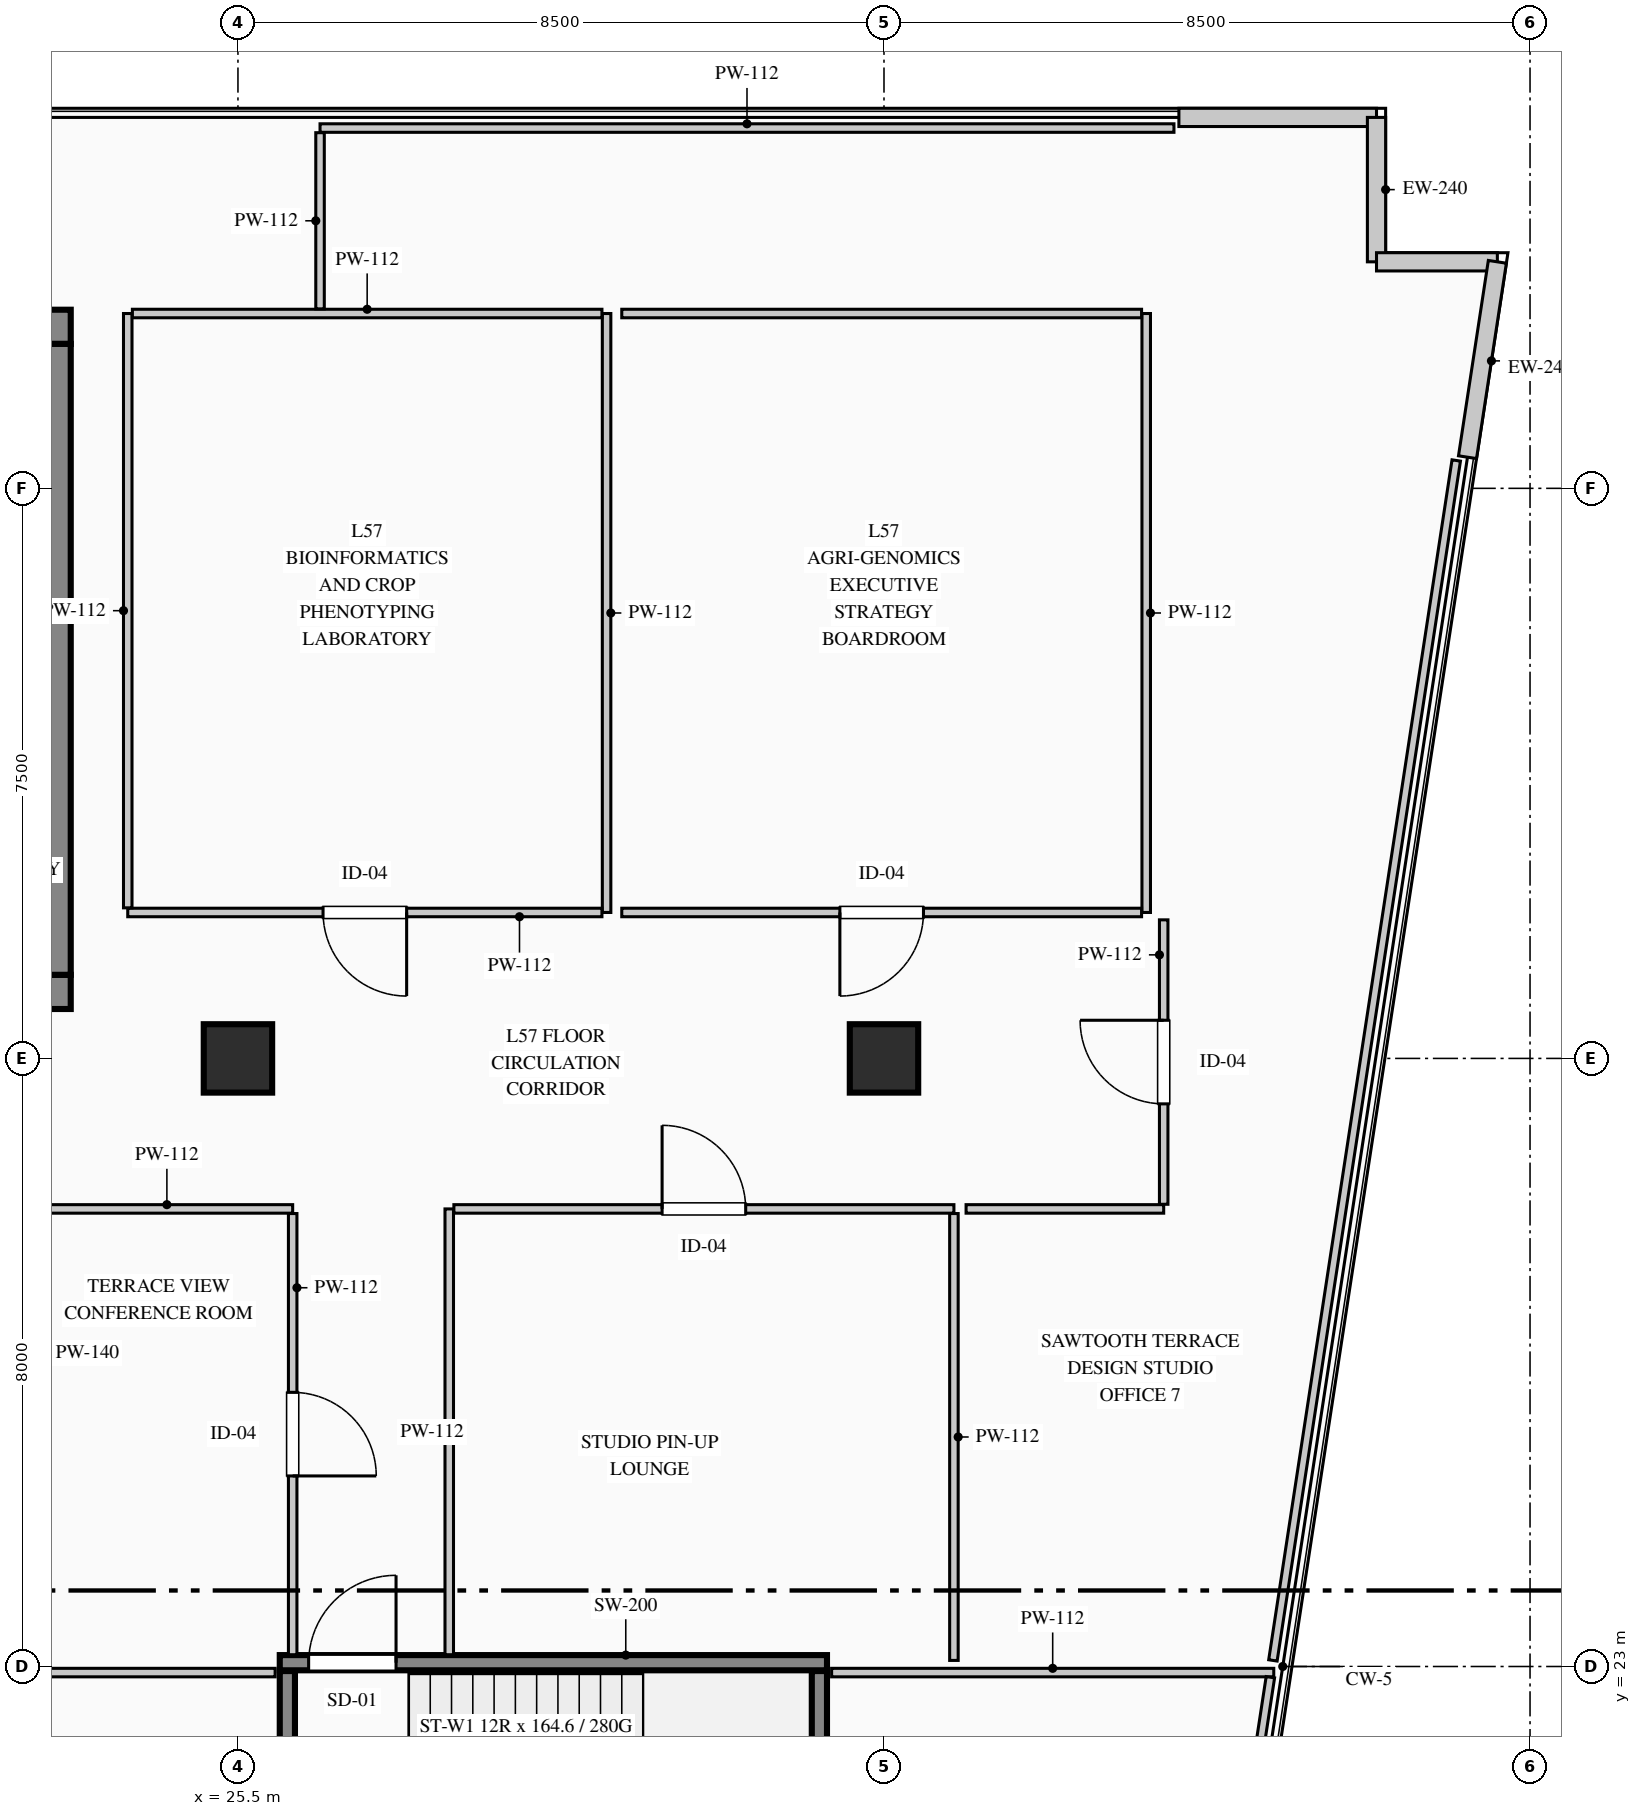
"""IFC4 building model, lengths in metres.
Left out: names, types, materials, properties, quantities, classifications, styles, units other than length and angle.
Written with IfcOpenShell. Run it as: python <this file> out.ifc"""

import sys

from ifc_helpers import new_model, si_unit, direction, frame, frame_2d, origin, origin_2d, place, context, subcontext, project, spatial, rectangle, extrude, element, fill, save


model = new_model("IFC4")
c1 = context("Model", 3, precision=1e-05, world=origin(), true_north=direction((0.0, 1.0)))
c2 = subcontext(c1, "Body", "Model", "MODEL_VIEW")
j1 = project(units=[si_unit("LENGTHUNIT", "METRE"), si_unit("PLANEANGLEUNIT", "RADIAN")], contexts=[c1])
p1 = place(None, origin())
s1 = spatial("IfcSite", under=j1, at=p1, CompositionType="ELEMENT")
p2 = place(p1, origin())
s2 = spatial("IfcBuilding", under=s1, at=p2, CompositionType="ELEMENT")
p3 = place(p2, frame((0.0, 0.0, 239.05)))
s3 = spatial("IfcBuildingStorey", under=s2, at=p3, CompositionType="ELEMENT", Elevation=239.05)
p4 = place(p3, frame((5.55, 40.625, 0.0), z_axis=(0.0, 0.0, 1.0), x_axis=(1.0, 0.0, 0.0)))
e1 = element("IfcWall", 1, at=p4, inside=s3, PredefinedType="SHEAR", context=c2, shape_type="SweptSolid", body=[
    extrude(rectangle(XDim=17.75, YDim=0.45, at=frame_2d((8.875, 0.0))), origin(), (0.0, 0.0, 1.0), 3.95),
])
p5 = place(p4, frame((15.895, 0.0, 0.0)))
e2 = element("IfcOpeningElement", 2, at=p5, cuts=e1, PredefinedType="OPENING", context=c2, shape_type="SweptSolid", body=[
    extrude(rectangle(XDim=1.18, YDim=2.25, at=frame_2d((0.59, 1.125))), frame((0.0, 0.235, 0.0), z_axis=(0.0, -1.0, 0.0), x_axis=(1.0, 0.0, 0.0)), (0.0, 0.0, 1.0), 0.47),
])
p6 = place(p3, frame((5.55, 31.875, 0.0), z_axis=(0.0, 0.0, 1.0), x_axis=(1.0, 0.0, 0.0)))
e3 = element("IfcWall", 3, at=p6, inside=s3, PredefinedType="SHEAR", context=c2, shape_type="SweptSolid", body=[
    extrude(rectangle(XDim=17.75, YDim=0.45, at=frame_2d((8.875, 0.0))), origin(), (0.0, 0.0, 1.0), 3.95),
])
p7 = place(p6, frame((3.1, 0.0, 0.0)))
e4 = element("IfcOpeningElement", 4, at=p7, cuts=e3, PredefinedType="OPENING", context=c2, shape_type="SweptSolid", body=[
    extrude(rectangle(XDim=1.2, YDim=2.2, at=frame_2d((0.6, 1.1))), frame((0.0, 0.235, 0.0), z_axis=(0.0, -1.0, 0.0), x_axis=(1.0, 0.0, 0.0)), (0.0, 0.0, 1.0), 0.47),
])
p8 = place(p6, frame((6.95, 0.0, 0.0)))
e5 = element("IfcOpeningElement", 5, at=p8, cuts=e3, PredefinedType="OPENING", context=c2, shape_type="SweptSolid", body=[
    extrude(rectangle(XDim=1.2, YDim=2.2, at=frame_2d((0.6, 1.1))), frame((0.0, 0.235, 0.0), z_axis=(0.0, -1.0, 0.0), x_axis=(1.0, 0.0, 0.0)), (0.0, 0.0, 1.0), 0.47),
])
p9 = place(p6, frame((8.8, 0.0, 0.0)))
e6 = element("IfcOpeningElement", 6, at=p9, cuts=e3, PredefinedType="OPENING", context=c2, shape_type="SweptSolid", body=[
    extrude(rectangle(XDim=1.15, YDim=2.2, at=frame_2d((0.575, 1.1))), frame((0.0, 0.235, 0.0), z_axis=(0.0, -1.0, 0.0), x_axis=(1.0, 0.0, 0.0)), (0.0, 0.0, 1.0), 0.47),
])
p10 = place(p6, frame((15.9, 0.0, 0.0)))
e7 = element("IfcOpeningElement", 7, at=p10, cuts=e3, PredefinedType="OPENING", context=c2, shape_type="SweptSolid", body=[
    extrude(rectangle(XDim=1.2, YDim=2.2, at=frame_2d((0.6, 1.1))), frame((0.0, 0.235, 0.0), z_axis=(0.0, -1.0, 0.0), x_axis=(1.0, 0.0, 0.0)), (0.0, 0.0, 1.0), 0.47),
])
p11 = place(p3, frame((23.075, 32.1, 0.0), z_axis=(0.0, 0.0, 1.0), x_axis=(0.0, 1.0, 0.0)))
e8 = element("IfcWall", 8, at=p11, inside=s3, PredefinedType="SHEAR", context=c2, shape_type="SweptSolid", body=[
    extrude(rectangle(XDim=8.3, YDim=0.45, at=frame_2d((4.15, 0.0))), origin(), (0.0, 0.0, 1.0), 3.95),
])
p12 = place(p3, frame((26.05, 23.05, 0.0), z_axis=(0.0, 0.0, 1.0), x_axis=(1.0, 0.0, 0.0)))
e9 = element("IfcWall", 9, at=p12, inside=s3, PredefinedType="SHEAR", context=c2, shape_type="SweptSolid", body=[
    extrude(rectangle(XDim=7.2, YDim=0.2, at=frame_2d((3.6, 0.0))), origin(), (0.0, 0.0, 1.0), 3.95),
])
p13 = place(p12, frame((0.38, 0.0, 0.0)))
e10 = element("IfcOpeningElement", 10, at=p13, cuts=e9, PredefinedType="OPENING", context=c2, shape_type="SweptSolid", body=[
    extrude(rectangle(XDim=1.15, YDim=2.2, at=frame_2d((0.575, 1.1))), frame((0.0, 0.11, 0.0), z_axis=(0.0, -1.0, 0.0), x_axis=(1.0, 0.0, 0.0)), (0.0, 0.0, 1.0), 0.22),
])
for number, where, z_axis, x_axis in (
    (11, (26.15, 19.81, 0.0), (0.0, 0.0, 1.0), (0.0, 1.0, 0.0)),
    (12, (33.15, 19.81, 0.0), (0.0, 0.0, 1.0), (0.0, 1.0, 0.0)),
):
    element("IfcWall", number, at=place(p3, frame(where, z_axis=z_axis, x_axis=x_axis)), inside=s3, PredefinedType="SHEAR", context=c2, shape_type="SweptSolid", body=[
        extrude(rectangle(XDim=3.13, YDim=0.2, at=frame_2d((1.565, 0.0))), origin(), (0.0, 0.0, 1.0), 3.95),
    ])
for number, where, z_axis, x_axis in (
    (13, (25.5, 31.0, 0.0), (0.0, 0.0, 1.0), (1.0, 0.0, 0.0)),
    (14, (34.0, 31.0, 0.0), (0.0, 0.0, 1.0), (1.0, 0.0, 0.0)),
):
    element("IfcColumn", number, at=place(p3, frame(where, z_axis=z_axis, x_axis=x_axis)), inside=s3, PredefinedType="COLUMN", context=c2, shape_type="SweptSolid", body=[
        extrude(rectangle(XDim=0.9, YDim=0.9, at=origin_2d()), origin(), (0.0, 0.0, 1.0), 3.95),
    ])
p14 = place(p3, frame((37.88, 43.38, 0.0), z_axis=(0.0, 0.0, 1.0), x_axis=(1.0, 0.0, 0.0)))
e15 = element("IfcWall", 15, at=p14, inside=s3, PredefinedType="STANDARD", context=c2, shape_type="SweptSolid", body=[
    extrude(rectangle(XDim=2.6, YDim=0.24, at=frame_2d((1.3, 0.0))), origin(), (0.0, 0.0, 1.0), 3.7),
])
p15 = place(p3, frame((40.48, 43.38, 0.0), z_axis=(0.0, 0.0, 1.0), x_axis=(0.0, -1.0, 0.0)))
e16 = element("IfcWall", 16, at=p15, inside=s3, PredefinedType="STANDARD", context=c2, shape_type="SweptSolid", body=[
    extrude(rectangle(XDim=1.9, YDim=0.24, at=frame_2d((0.95, 0.0))), origin(), (0.0, 0.0, 1.0), 3.7),
])
p16 = place(p3, frame((40.48, 41.48, 0.0), z_axis=(0.0, 0.0, 1.0), x_axis=(1.0, 0.0, 0.0)))
e17 = element("IfcWall", 17, at=p16, inside=s3, PredefinedType="STANDARD", context=c2, shape_type="SweptSolid", body=[
    extrude(rectangle(XDim=1.59, YDim=0.24, at=frame_2d((0.795, 0.0))), origin(), (0.0, 0.0, 1.0), 3.7),
])
p17 = place(p3, frame((42.07, 41.48, 0.0), z_axis=(0.0, 0.0, 1.0), x_axis=(-0.151090396132, -0.988519950328, 0.0)))
e18 = element("IfcWall", 18, at=p17, inside=s3, PredefinedType="STANDARD", context=c2, shape_type="SweptSolid", body=[
    extrude(rectangle(XDim=2.6, YDim=0.24, at=frame_2d((1.3, 0.0))), origin(), (0.0, 0.0, 1.0), 3.7),
])
p18 = place(p3, frame((30.35, 40.8, 0.0), z_axis=(0.0, 0.0, 1.0), x_axis=(0.0, -1.0, 0.0)))
e19 = element("IfcWall", 19, at=p18, inside=s3, PredefinedType="PARTITIONING", context=c2, shape_type="SweptSolid", body=[
    extrude(rectangle(XDim=7.88, YDim=0.112, at=frame_2d((3.94, 0.0))), origin(), (0.0, 0.0, 1.0), 3.7),
])
p19 = place(p3, frame((30.289, 32.92, 0.0), z_axis=(0.0, 0.0, 1.0), x_axis=(-1.0, 0.0, 0.0)))
e20 = element("IfcWall", 20, at=p19, inside=s3, PredefinedType="PARTITIONING", context=c2, shape_type="SweptSolid", body=[
    extrude(rectangle(XDim=6.239, YDim=0.112, at=frame_2d((3.12, 0.0))), origin(), (0.0, 0.0, 1.0), 3.7),
])
p20 = place(p19, frame((2.57, 0.0, 0.0)))
e21 = element("IfcOpeningElement", 21, at=p20, cuts=e20, PredefinedType="OPENING", context=c2, shape_type="SweptSolid", body=[
    extrude(rectangle(XDim=1.1, YDim=2.2, at=frame_2d((0.55, 1.1))), frame((0.0, 0.066, 0.0), z_axis=(0.0, -1.0, 0.0), x_axis=(1.0, 0.0, 0.0)), (0.0, 0.0, 1.0), 0.132),
])
p21 = place(p3, frame((24.05, 32.981, 0.0), z_axis=(0.0, 0.0, 1.0), x_axis=(0.0, 1.0, 0.0)))
e22 = element("IfcWall", 22, at=p21, inside=s3, PredefinedType="PARTITIONING", context=c2, shape_type="SweptSolid", body=[
    extrude(rectangle(XDim=7.819, YDim=0.112, at=frame_2d((3.91, 0.0))), origin(), (0.0, 0.0, 1.0), 3.7),
])
p22 = place(p3, frame((24.111, 40.8, 0.0), z_axis=(0.0, 0.0, 1.0), x_axis=(1.0, 0.0, 0.0)))
e23 = element("IfcWall", 23, at=p22, inside=s3, PredefinedType="PARTITIONING", context=c2, shape_type="SweptSolid", body=[
    extrude(rectangle(XDim=6.178, YDim=0.112, at=frame_2d((3.089, 0.0))), origin(), (0.0, 0.0, 1.0), 3.7),
])
p23 = place(p3, frame((37.45, 40.8, 0.0), z_axis=(0.0, 0.0, 1.0), x_axis=(0.0, -1.0, 0.0)))
e24 = element("IfcWall", 24, at=p23, inside=s3, PredefinedType="PARTITIONING", context=c2, shape_type="SweptSolid", body=[
    extrude(rectangle(XDim=7.88, YDim=0.112, at=frame_2d((3.94, 0.0))), origin(), (0.0, 0.0, 1.0), 3.7),
])
p24 = place(p3, frame((37.389, 32.92, 0.0), z_axis=(0.0, 0.0, 1.0), x_axis=(-1.0, 0.0, 0.0)))
e25 = element("IfcWall", 25, at=p24, inside=s3, PredefinedType="PARTITIONING", context=c2, shape_type="SweptSolid", body=[
    extrude(rectangle(XDim=6.839, YDim=0.112, at=frame_2d((3.419, 0.0))), origin(), (0.0, 0.0, 1.0), 3.7),
])
p25 = place(p24, frame((2.869, 0.0, 0.0)))
e26 = element("IfcOpeningElement", 26, at=p25, cuts=e25, PredefinedType="OPENING", context=c2, shape_type="SweptSolid", body=[
    extrude(rectangle(XDim=1.1, YDim=2.2, at=frame_2d((0.55, 1.1))), frame((0.0, 0.066, 0.0), z_axis=(0.0, -1.0, 0.0), x_axis=(1.0, 0.0, 0.0)), (0.0, 0.0, 1.0), 0.132),
])
p26 = place(p3, frame((30.55, 40.8, 0.0), z_axis=(0.0, 0.0, 1.0), x_axis=(1.0, 0.0, 0.0)))
e27 = element("IfcWall", 27, at=p26, inside=s3, PredefinedType="PARTITIONING", context=c2, shape_type="SweptSolid", body=[
    extrude(rectangle(XDim=6.839, YDim=0.112, at=frame_2d((3.419, 0.0))), origin(), (0.0, 0.0, 1.0), 3.7),
])
p27 = place(p3, frame((33.311, 22.92, 0.0), z_axis=(0.0, 0.0, 1.0), x_axis=(1.0, 0.0, 0.0)))
e28 = element("IfcWall", 28, at=p27, inside=s3, PredefinedType="PARTITIONING", context=c2, shape_type="SweptSolid", body=[
    extrude(rectangle(XDim=5.817, YDim=0.112, at=frame_2d((2.909, 0.0))), origin(), (0.0, 0.0, 1.0), 3.7),
])
p28 = place(p3, frame((39.084, 22.859, 0.0), z_axis=(0.0, 0.0, 1.0), x_axis=(-0.151051087355, -0.988525957681, 0.0)))
e29 = element("IfcWall", 29, at=p28, inside=s3, PredefinedType="PARTITIONING", context=c2, shape_type="SweptSolid", body=[
    extrude(rectangle(XDim=15.865, YDim=0.112, at=frame_2d((7.933, 0.0))), origin(), (0.0, 0.0, 1.0), 3.7),
])
p29 = place(p3, frame((22.91, 22.92, 0.0), z_axis=(0.0, 0.0, 1.0), x_axis=(1.0, 0.0, 0.0)))
e30 = element("IfcWall", 30, at=p29, inside=s3, PredefinedType="PARTITIONING", context=c2, shape_type="SweptSolid", body=[
    extrude(rectangle(XDim=3.079, YDim=0.112, at=frame_2d((1.54, 0.0))), origin(), (0.0, 0.0, 1.0), 3.7),
])
p30 = place(p3, frame((22.91, 29.02, 0.0), z_axis=(0.0, 0.0, 1.0), x_axis=(1.0, 0.0, 0.0)))
e31 = element("IfcWall", 31, at=p30, inside=s3, PredefinedType="PARTITIONING", context=c2, shape_type="SweptSolid", body=[
    extrude(rectangle(XDim=3.31, YDim=0.112, at=frame_2d((1.655, 0.0))), origin(), (0.0, 0.0, 1.0), 3.485),
])
p31 = place(p3, frame((26.22, 28.959, 0.0), z_axis=(0.0, 0.0, 1.0), x_axis=(0.0, -1.0, 0.0)))
e32 = element("IfcWall", 32, at=p31, inside=s3, PredefinedType="PARTITIONING", context=c2, shape_type="SweptSolid", body=[
    extrude(rectangle(XDim=5.804, YDim=0.112, at=frame_2d((2.902, 0.0))), origin(), (0.0, 0.0, 1.0), 3.7),
])
p32 = place(p31, frame((2.352, 0.0, 0.0)))
e33 = element("IfcOpeningElement", 33, at=p32, cuts=e32, PredefinedType="OPENING", context=c2, shape_type="SweptSolid", body=[
    extrude(rectangle(XDim=1.1, YDim=2.2, at=frame_2d((0.55, 1.1))), frame((0.0, 0.066, 0.0), z_axis=(0.0, -1.0, 0.0), x_axis=(1.0, 0.0, 0.0)), (0.0, 0.0, 1.0), 0.132),
])
p33 = place(p3, frame((28.28, 23.155, 0.0), z_axis=(0.0, 0.0, 1.0), x_axis=(0.0, 1.0, 0.0)))
e34 = element("IfcWall", 34, at=p33, inside=s3, PredefinedType="PARTITIONING", context=c2, shape_type="SweptSolid", body=[
    extrude(rectangle(XDim=5.865, YDim=0.112, at=frame_2d((2.933, 0.0))), origin(), (0.0, 0.0, 1.0), 3.7),
])
p34 = place(p3, frame((28.341, 29.02, 0.0), z_axis=(0.0, 0.0, 1.0), x_axis=(1.0, 0.0, 0.0)))
e35 = element("IfcWall", 35, at=p34, inside=s3, PredefinedType="PARTITIONING", context=c2, shape_type="SweptSolid", body=[
    extrude(rectangle(XDim=6.579, YDim=0.112, at=frame_2d((3.29, 0.0))), origin(), (0.0, 0.0, 1.0), 3.485),
])
p35 = place(p34, frame((2.74, 0.0, 0.0)))
e36 = element("IfcOpeningElement", 36, at=p35, cuts=e35, PredefinedType="OPENING", context=c2, shape_type="SweptSolid", body=[
    extrude(rectangle(XDim=1.1, YDim=2.2, at=frame_2d((0.55, 1.1))), frame((0.0, 0.066, 0.0), z_axis=(0.0, -1.0, 0.0), x_axis=(1.0, 0.0, 0.0)), (0.0, 0.0, 1.0), 0.132),
])
p36 = place(p3, frame((34.92, 28.959, 0.0), z_axis=(0.0, 0.0, 1.0), x_axis=(0.0, -1.0, 0.0)))
e37 = element("IfcWall", 37, at=p36, inside=s3, PredefinedType="PARTITIONING", context=c2, shape_type="SweptSolid", body=[
    extrude(rectangle(XDim=5.879, YDim=0.112, at=frame_2d((2.939, 0.0))), origin(), (0.0, 0.0, 1.0), 3.7),
])
p37 = place(p3, frame((26.58, 43.24, 0.0), z_axis=(0.0, 0.0, 1.0), x_axis=(1.0, 0.0, 0.0)))
e38 = element("IfcWall", 38, at=p37, inside=s3, PredefinedType="PARTITIONING", context=c2, shape_type="SweptSolid", body=[
    extrude(rectangle(XDim=11.235, YDim=0.112, at=frame_2d((5.617, 0.0))), origin(), (0.0, 0.0, 1.0), 3.7),
])
p38 = place(p3, frame((41.529, 38.867, 0.0), z_axis=(0.0, 0.0, 1.0), x_axis=(-0.151041582551, -0.98852741001, 0.0)))
e39 = element("IfcWall", 39, at=p38, inside=s3, PredefinedType="PARTITIONING", context=c2, shape_type="SweptSolid", body=[
    extrude(rectangle(XDim=15.97, YDim=0.112, at=frame_2d((7.985, 0.0))), origin(), (0.0, 0.0, 1.0), 3.7),
])
p39 = place(p3, frame((35.08, 29.02, 0.0), z_axis=(0.0, 0.0, 1.0), x_axis=(1.0, 0.0, 0.0)))
e40 = element("IfcWall", 40, at=p39, inside=s3, PredefinedType="PARTITIONING", context=c2, shape_type="SweptSolid", body=[
    extrude(rectangle(XDim=2.6, YDim=0.112, at=frame_2d((1.3, 0.0))), origin(), (0.0, 0.0, 1.0), 3.7),
])
p40 = place(p3, frame((37.68, 29.081, 0.0), z_axis=(0.0, 0.0, 1.0), x_axis=(0.0, 1.0, 0.0)))
e41 = element("IfcWall", 41, at=p40, inside=s3, PredefinedType="PARTITIONING", context=c2, shape_type="SweptSolid", body=[
    extrude(rectangle(XDim=3.742, YDim=0.112, at=frame_2d((1.871, 0.0))), origin(), (0.0, 0.0, 1.0), 3.7),
])
p41 = place(p40, frame((1.321, 0.0, 0.0)))
e42 = element("IfcOpeningElement", 42, at=p41, cuts=e41, PredefinedType="OPENING", context=c2, shape_type="SweptSolid", body=[
    extrude(rectangle(XDim=1.1, YDim=2.2, at=frame_2d((0.55, 1.1))), frame((0.0, 0.066, 0.0), z_axis=(0.0, -1.0, 0.0), x_axis=(1.0, 0.0, 0.0)), (0.0, 0.0, 1.0), 0.132),
])
p42 = place(p3, frame((26.58, 40.861, 0.0), z_axis=(0.0, 0.0, 1.0), x_axis=(0.0, 1.0, 0.0)))
e43 = element("IfcWall", 43, at=p42, inside=s3, PredefinedType="PARTITIONING", context=c2, shape_type="SweptSolid", body=[
    extrude(rectangle(XDim=2.318, YDim=0.112, at=frame_2d((1.159, 0.0))), origin(), (0.0, 0.0, 1.0), 3.7),
])
p43 = place(p13, origin())
e44 = element("IfcDoor", 44, at=p43, inside=s3, OperationType="SINGLE_SWING_RIGHT", PredefinedType="DOOR", context=c2, shape_type="SweptSolid", body=[
    extrude(rectangle(XDim=1.15, YDim=2.2, at=frame_2d((0.575, 1.1))), frame((0.0, 0.025, 0.0), z_axis=(0.0, -1.0, 0.0), x_axis=(1.0, 0.0, 0.0)), (0.0, 0.0, 1.0), 0.05),
])
fill(e10, e44)
p44 = place(p20, origin())
e45 = element("IfcDoor", 45, at=p44, inside=s3, OperationType="SINGLE_SWING_LEFT", PredefinedType="DOOR", context=c2, shape_type="SweptSolid", body=[
    extrude(rectangle(XDim=1.1, YDim=2.2, at=frame_2d((0.55, 1.1))), frame((0.0, 0.025, 0.0), z_axis=(0.0, -1.0, 0.0), x_axis=(1.0, 0.0, 0.0)), (0.0, 0.0, 1.0), 0.05),
])
fill(e21, e45)
p45 = place(p25, origin())
e46 = element("IfcDoor", 46, at=p45, inside=s3, OperationType="SINGLE_SWING_RIGHT", PredefinedType="DOOR", context=c2, shape_type="SweptSolid", body=[
    extrude(rectangle(XDim=1.1, YDim=2.2, at=frame_2d((0.55, 1.1))), frame((0.0, 0.025, 0.0), z_axis=(0.0, -1.0, 0.0), x_axis=(1.0, 0.0, 0.0)), (0.0, 0.0, 1.0), 0.05),
])
fill(e26, e46)
p46 = place(p32, origin())
e47 = element("IfcDoor", 47, at=p46, inside=s3, OperationType="SINGLE_SWING_RIGHT", PredefinedType="DOOR", context=c2, shape_type="SweptSolid", body=[
    extrude(rectangle(XDim=1.1, YDim=2.2, at=frame_2d((0.55, 1.1))), frame((0.0, 0.025, 0.0), z_axis=(0.0, -1.0, 0.0), x_axis=(1.0, 0.0, 0.0)), (0.0, 0.0, 1.0), 0.05),
])
fill(e33, e47)
p47 = place(p35, origin())
e48 = element("IfcDoor", 48, at=p47, inside=s3, OperationType="SINGLE_SWING_LEFT", PredefinedType="DOOR", context=c2, shape_type="SweptSolid", body=[
    extrude(rectangle(XDim=1.1, YDim=2.2, at=frame_2d((0.55, 1.1))), frame((0.0, 0.025, 0.0), z_axis=(0.0, -1.0, 0.0), x_axis=(1.0, 0.0, 0.0)), (0.0, 0.0, 1.0), 0.05),
])
fill(e36, e48)
p48 = place(p41, origin())
e49 = element("IfcDoor", 49, at=p48, inside=s3, OperationType="SINGLE_SWING_RIGHT", PredefinedType="DOOR", context=c2, shape_type="SweptSolid", body=[
    extrude(rectangle(XDim=1.1, YDim=2.2, at=frame_2d((0.55, 1.1))), frame((0.0, 0.025, 0.0), z_axis=(0.0, -1.0, 0.0), x_axis=(1.0, 0.0, 0.0)), (0.0, 0.0, 1.0), 0.05),
])
fill(e42, e49)
save(model, sys.argv[1])
